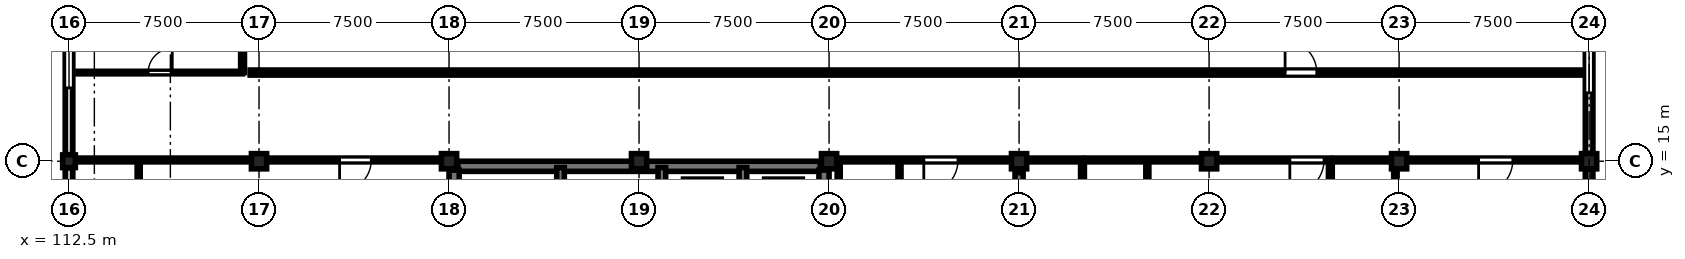
"""IFC4 building model, lengths in metres.
Left out: names, types, materials, properties, quantities, classifications, styles, units other than length and angle.
Written with IfcOpenShell. Run it as: python <this file> out.ifc"""

import sys

from ifc_helpers import new_model, si_unit, direction, frame, frame_2d, origin, origin_2d, place, context, subcontext, project, spatial, rectangle, circle, extrude, element, fill, save


model = new_model("IFC4")
c1 = context("Model", 3, precision=1e-05, world=origin(), true_north=direction((0.0, 1.0)))
c2 = subcontext(c1, "Body", "Model", "MODEL_VIEW")
j1 = project(units=[si_unit("LENGTHUNIT", "METRE"), si_unit("PLANEANGLEUNIT", "RADIAN")], contexts=[c1])
p1 = place(None, origin())
s1 = spatial("IfcSite", under=j1, at=p1, CompositionType="ELEMENT")
p2 = place(p1, origin())
s2 = spatial("IfcBuilding", under=s1, at=p2, CompositionType="ELEMENT")
p3 = place(p2, frame((0.0, 0.0, 14.1)))
s3 = spatial("IfcBuildingStorey", under=s2, at=p3, CompositionType="ELEMENT", Elevation=14.1)
p4 = place(p3, frame((112.5, 15.0, 0.0), z_axis=(0.0, 0.0, 1.0), x_axis=(1.0, 0.0, 0.0)))
e1 = element("IfcColumn", 1, at=p4, inside=s3, PredefinedType="COLUMN", context=c2, shape_type="SweptSolid", body=[
    extrude(rectangle(XDim=0.5, YDim=0.5, at=origin_2d()), origin(), (0.0, 0.0, 1.0), 3.75),
])
p5 = place(p3, frame((120.0, 15.0, 0.0), z_axis=(0.0, 0.0, 1.0), x_axis=(1.0, 0.0, 0.0)))
e2 = element("IfcColumn", 2, at=p5, inside=s3, PredefinedType="COLUMN", context=c2, shape_type="SweptSolid", body=[
    extrude(circle(Radius=0.3, at=origin_2d()), origin(), (0.0, 0.0, 1.0), 3.75),
])
for number, where, z_axis, x_axis in (
    (3, (127.5, 15.0, 0.0), (0.0, 0.0, 1.0), (1.0, 0.0, 0.0)),
    (4, (135.0, 15.0, 0.0), (0.0, 0.0, 1.0), (1.0, 0.0, 0.0)),
):
    element("IfcColumn", number, at=place(p3, frame(where, z_axis=z_axis, x_axis=x_axis)), inside=s3, PredefinedType="COLUMN", context=c2, shape_type="SweptSolid", body=[
        extrude(rectangle(XDim=0.6, YDim=0.6, at=origin_2d()), origin(), (0.0, 0.0, 1.0), 3.75),
    ])
p6 = place(p3, frame((142.5, 15.0, 0.0), z_axis=(0.0, 0.0, 1.0), x_axis=(1.0, 0.0, 0.0)))
e5 = element("IfcColumn", 5, at=p6, inside=s3, PredefinedType="COLUMN", context=c2, shape_type="SweptSolid", body=[
    extrude(circle(Radius=0.3, at=origin_2d()), origin(), (0.0, 0.0, 1.0), 3.75),
])
for number, where, z_axis, x_axis in (
    (6, (150.0, 15.0, 0.0), (0.0, 0.0, 1.0), (1.0, 0.0, 0.0)),
    (7, (157.5, 15.0, 0.0), (0.0, 0.0, 1.0), (1.0, 0.0, 0.0)),
):
    element("IfcColumn", number, at=place(p3, frame(where, z_axis=z_axis, x_axis=x_axis)), inside=s3, PredefinedType="COLUMN", context=c2, shape_type="SweptSolid", body=[
        extrude(rectangle(XDim=0.6, YDim=0.6, at=origin_2d()), origin(), (0.0, 0.0, 1.0), 3.75),
    ])
p7 = place(p3, frame((165.0, 15.0, 0.0), z_axis=(0.0, 0.0, 1.0), x_axis=(1.0, 0.0, 0.0)))
e8 = element("IfcColumn", 8, at=p7, inside=s3, PredefinedType="COLUMN", context=c2, shape_type="SweptSolid", body=[
    extrude(circle(Radius=0.3, at=origin_2d()), origin(), (0.0, 0.0, 1.0), 3.75),
])
p8 = place(p3, frame((172.5, 15.0, 0.0), z_axis=(0.0, 0.0, 1.0), x_axis=(1.0, 0.0, 0.0)))
e9 = element("IfcColumn", 9, at=p8, inside=s3, PredefinedType="COLUMN", context=c2, shape_type="SweptSolid", body=[
    extrude(rectangle(XDim=0.6, YDim=0.6, at=origin_2d()), origin(), (0.0, 0.0, 1.0), 3.75),
])
p9 = place(p3, frame((150.0, 7.95, 0.0), z_axis=(0.0, 0.0, 1.0), x_axis=(0.0, 1.0, 0.0)))
e10 = element("IfcWall", 10, at=p9, inside=s3, PredefinedType="SHEAR", context=c2, shape_type="SweptSolid", body=[
    extrude(rectangle(XDim=6.6, YDim=0.32, at=frame_2d((3.3, 0.0))), origin(), (0.0, 0.0, 1.0), 2.92),
])
p10 = place(p3, frame((112.5, 7.785, 0.0), z_axis=(0.0, 0.0, 1.0), x_axis=(0.0, 1.0, 0.0)))
e11 = element("IfcWall", 11, at=p10, inside=s3, PredefinedType="STANDARD", context=c2, shape_type="SweptSolid", body=[
    extrude(rectangle(XDim=6.955, YDim=0.3, at=frame_2d((3.478, 0.0))), origin(), (0.0, 0.0, 1.0), 2.87),
])
p11 = place(p10, frame((2.677, 0.0, 0.9)))
e12 = element("IfcOpeningElement", 12, at=p11, cuts=e11, PredefinedType="OPENING", context=c2, shape_type="SweptSolid", body=[
    extrude(rectangle(XDim=1.6, YDim=1.69, at=frame_2d((0.8, 0.845))), frame((0.0, 0.16, 0.0), z_axis=(0.0, -1.0, 0.0), x_axis=(1.0, 0.0, 0.0)), (0.0, 0.0, 1.0), 0.32),
])
p12 = place(p3, frame((112.5, 15.26, 0.0), z_axis=(0.0, 0.0, 1.0), x_axis=(0.0, 1.0, 0.0)))
e13 = element("IfcWall", 13, at=p12, inside=s3, PredefinedType="STANDARD", context=c2, shape_type="SweptSolid", body=[
    extrude(rectangle(XDim=7.07, YDim=0.3, at=frame_2d((3.535, 0.0))), origin(), (0.0, 0.0, 1.0), 2.87),
])
p13 = place(p12, frame((2.635, 0.0, 0.9)))
e14 = element("IfcOpeningElement", 14, at=p13, cuts=e13, PredefinedType="OPENING", context=c2, shape_type="SweptSolid", body=[
    extrude(rectangle(XDim=1.8, YDim=1.69, at=frame_2d((0.9, 0.845))), frame((0.0, 0.16, 0.0), z_axis=(0.0, -1.0, 0.0), x_axis=(1.0, 0.0, 0.0)), (0.0, 0.0, 1.0), 0.32),
])
p14 = place(p3, frame((172.5, 14.69, 0.0), z_axis=(0.0, 0.0, 1.0), x_axis=(0.0, -1.0, 0.0)))
e15 = element("IfcWall", 15, at=p14, inside=s3, PredefinedType="STANDARD", context=c2, shape_type="SweptSolid", body=[
    extrude(rectangle(XDim=6.88, YDim=0.3, at=frame_2d((3.44, 0.0))), origin(), (0.0, 0.0, 1.0), 2.87),
])
p15 = place(p14, frame((2.69, 0.0, 0.9)))
e16 = element("IfcOpeningElement", 16, at=p15, cuts=e15, PredefinedType="OPENING", context=c2, shape_type="SweptSolid", body=[
    extrude(rectangle(XDim=1.5, YDim=1.69, at=frame_2d((0.75, 0.845))), frame((0.0, 0.16, 0.0), z_axis=(0.0, -1.0, 0.0), x_axis=(1.0, 0.0, 0.0)), (0.0, 0.0, 1.0), 0.32),
])
p16 = place(p3, frame((172.5, 22.19, 0.0), z_axis=(0.0, 0.0, 1.0), x_axis=(0.0, -1.0, 0.0)))
e17 = element("IfcWall", 17, at=p16, inside=s3, PredefinedType="STANDARD", context=c2, shape_type="SweptSolid", body=[
    extrude(rectangle(XDim=6.88, YDim=0.3, at=frame_2d((3.44, 0.0))), origin(), (0.0, 0.0, 1.0), 2.87),
])
p17 = place(p16, frame((2.39, 0.0, 0.9)))
e18 = element("IfcOpeningElement", 18, at=p17, cuts=e17, PredefinedType="OPENING", context=c2, shape_type="SweptSolid", body=[
    extrude(rectangle(XDim=2.1, YDim=1.69, at=frame_2d((1.05, 0.845))), frame((0.0, 0.16, 0.0), z_axis=(0.0, -1.0, 0.0), x_axis=(1.0, 0.0, 0.0)), (0.0, 0.0, 1.0), 0.32),
])
p18 = place(p3, frame((127.85, 14.8, 0.0), z_axis=(0.0, 0.0, 1.0), x_axis=(1.0, 0.0, 0.0)))
e19 = element("IfcWall", 19, at=p18, inside=s3, PredefinedType="SHEAR", context=c2, shape_type="SweptSolid", body=[
    extrude(rectangle(XDim=14.3, YDim=0.4, at=frame_2d((7.15, 0.0))), origin(), (0.0, 0.0, 1.0), 3.47),
])
p19 = place(p3, frame((127.7, 7.85, 0.0), z_axis=(0.0, 0.0, 1.0), x_axis=(0.0, 1.0, 0.0)))
e20 = element("IfcWall", 20, at=p19, inside=s3, PredefinedType="SHEAR", context=c2, shape_type="SweptSolid", body=[
    extrude(rectangle(XDim=6.8, YDim=0.4, at=frame_2d((3.4, 0.0))), origin(), (0.0, 0.0, 1.0), 3.47),
])
p20 = place(p3, frame((142.3, 11.6, 0.0), z_axis=(0.0, 0.0, 1.0), x_axis=(0.0, 1.0, 0.0)))
e21 = element("IfcWall", 21, at=p20, inside=s3, PredefinedType="SHEAR", context=c2, shape_type="SweptSolid", body=[
    extrude(rectangle(XDim=3.05, YDim=0.4, at=frame_2d((1.525, 0.0))), origin(), (0.0, 0.0, 1.0), 3.47),
])
for number, where, z_axis, x_axis in (
    (22, (131.9, 11.6, 0.0), (0.0, 0.0, 1.0), (0.0, 1.0, 0.0)),
    (23, (135.9, 11.6, 0.0), (0.0, 0.0, 1.0), (0.0, 1.0, 0.0)),
    (24, (139.1, 11.6, 0.0), (0.0, 0.0, 1.0), (0.0, 1.0, 0.0)),
):
    element("IfcWall", number, at=place(p3, frame(where, z_axis=z_axis, x_axis=x_axis)), inside=s3, PredefinedType="SHEAR", context=c2, shape_type="SweptSolid", body=[
        extrude(rectangle(XDim=3.15, YDim=0.3, at=frame_2d((1.575, 0.0))), origin(), (0.0, 0.0, 1.0), 3.47),
    ])
p21 = place(p3, frame((127.2, 15.05, 0.0), z_axis=(0.0, 0.0, 1.0), x_axis=(-1.0, 0.0, 0.0)))
e25 = element("IfcWall", 25, at=p21, inside=s3, PredefinedType="PARTITIONING", context=c2, shape_type="SweptSolid", body=[
    extrude(rectangle(XDim=14.35, YDim=0.15, at=frame_2d((7.175, 0.0))), origin(), (0.0, 0.0, 1.0), 2.855),
])
p22 = place(p21, frame((2.77, 0.0, 0.0)))
e26 = element("IfcOpeningElement", 26, at=p22, cuts=e25, PredefinedType="OPENING", context=c2, shape_type="SweptSolid", body=[
    extrude(rectangle(XDim=1.25, YDim=2.2, at=frame_2d((0.625, 1.1))), frame((0.0, 0.085, 0.0), z_axis=(0.0, -1.0, 0.0), x_axis=(1.0, 0.0, 0.0)), (0.0, 0.0, 1.0), 0.17),
])
p23 = place(p3, frame((115.25, 13.05, 0.0), z_axis=(0.0, 0.0, 1.0), x_axis=(0.0, 1.0, 0.0)))
e27 = element("IfcWall", 27, at=p23, inside=s3, PredefinedType="PARTITIONING", context=c2, shape_type="SweptSolid", body=[
    extrude(rectangle(XDim=2.0, YDim=0.12, at=frame_2d((1.0, 0.0))), origin(), (0.0, 0.0, 1.0), 3.455),
])
p24 = place(p3, frame((152.503, 15.05, 0.0), z_axis=(0.0, 0.0, 1.0), x_axis=(-1.0, 0.0, 0.0)))
e28 = element("IfcWall", 28, at=p24, inside=s3, PredefinedType="PARTITIONING", context=c2, shape_type="SweptSolid", body=[
    extrude(rectangle(XDim=9.624, YDim=0.15, at=frame_2d((4.812, 0.0))), origin(), (0.0, 0.0, 1.0), 2.855),
])
p25 = place(p24, frame((4.914, 0.0, 0.0)))
e29 = element("IfcOpeningElement", 29, at=p25, cuts=e28, PredefinedType="OPENING", context=c2, shape_type="SweptSolid", body=[
    extrude(rectangle(XDim=1.35, YDim=2.25, at=frame_2d((0.675, 1.125))), frame((0.0, 0.085, 0.0), z_axis=(0.0, -1.0, 0.0), x_axis=(1.0, 0.0, 0.0)), (0.0, 0.0, 1.0), 0.17),
])
p26 = place(p3, frame((145.28, 13.05, 0.0), z_axis=(0.0, 0.0, 1.0), x_axis=(0.0, 1.0, 0.0)))
e30 = element("IfcWall", 30, at=p26, inside=s3, PredefinedType="PARTITIONING", context=c2, shape_type="SweptSolid", body=[
    extrude(rectangle(XDim=2.0, YDim=0.12, at=frame_2d((1.0, 0.0))), origin(), (0.0, 0.0, 1.0), 3.455),
])
p27 = place(p3, frame((162.287, 15.05, 0.0), z_axis=(0.0, 0.0, 1.0), x_axis=(-1.0, 0.0, 0.0)))
e31 = element("IfcWall", 31, at=p27, inside=s3, PredefinedType="PARTITIONING", context=c2, shape_type="SweptSolid", body=[
    extrude(rectangle(XDim=9.623, YDim=0.15, at=frame_2d((4.812, 0.0))), origin(), (0.0, 0.0, 1.0), 2.855),
])
p28 = place(p27, frame((0.25, 0.0, 0.0)))
e32 = element("IfcOpeningElement", 32, at=p28, cuts=e31, PredefinedType="OPENING", context=c2, shape_type="SweptSolid", body=[
    extrude(rectangle(XDim=1.35, YDim=2.25, at=frame_2d((0.675, 1.125))), frame((0.0, 0.085, 0.0), z_axis=(0.0, -1.0, 0.0), x_axis=(1.0, 0.0, 0.0)), (0.0, 0.0, 1.0), 0.17),
])
p29 = place(p3, frame((155.063, 13.05, 0.0), z_axis=(0.0, 0.0, 1.0), x_axis=(0.0, 1.0, 0.0)))
e33 = element("IfcWall", 33, at=p29, inside=s3, PredefinedType="PARTITIONING", context=c2, shape_type="SweptSolid", body=[
    extrude(rectangle(XDim=2.0, YDim=0.12, at=frame_2d((1.0, 0.0))), origin(), (0.0, 0.0, 1.0), 3.455),
])
p30 = place(p3, frame((172.07, 15.05, 0.0), z_axis=(0.0, 0.0, 1.0), x_axis=(-1.0, 0.0, 0.0)))
e34 = element("IfcWall", 34, at=p30, inside=s3, PredefinedType="PARTITIONING", context=c2, shape_type="SweptSolid", body=[
    extrude(rectangle(XDim=9.623, YDim=0.15, at=frame_2d((4.812, 0.0))), origin(), (0.0, 0.0, 1.0), 2.855),
])
p31 = place(p30, frame((2.582, 0.0, 0.0)))
e35 = element("IfcOpeningElement", 35, at=p31, cuts=e34, PredefinedType="OPENING", context=c2, shape_type="SweptSolid", body=[
    extrude(rectangle(XDim=1.35, YDim=2.25, at=frame_2d((0.675, 1.125))), frame((0.0, 0.085, 0.0), z_axis=(0.0, -1.0, 0.0), x_axis=(1.0, 0.0, 0.0)), (0.0, 0.0, 1.0), 0.17),
])
p32 = place(p3, frame((164.847, 13.05, 0.0), z_axis=(0.0, 0.0, 1.0), x_axis=(0.0, 1.0, 0.0)))
e36 = element("IfcWall", 36, at=p32, inside=s3, PredefinedType="PARTITIONING", context=c2, shape_type="SweptSolid", body=[
    extrude(rectangle(XDim=2.0, YDim=0.12, at=frame_2d((1.0, 0.0))), origin(), (0.0, 0.0, 1.0), 2.955),
])
p33 = place(p3, frame((112.85, 18.5, 0.0), z_axis=(0.0, 0.0, 1.0), x_axis=(1.0, 0.0, 0.0)))
e37 = element("IfcWall", 37, at=p33, inside=s3, PredefinedType="PARTITIONING", context=c2, shape_type="SweptSolid", body=[
    extrude(rectangle(XDim=6.5, YDim=0.1, at=frame_2d((3.25, 0.0))), origin(), (0.0, 0.0, 1.0), 3.455),
])
p34 = place(p33, frame((2.775, 0.0, 0.0)))
e38 = element("IfcOpeningElement", 38, at=p34, cuts=e37, PredefinedType="OPENING", context=c2, shape_type="SweptSolid", body=[
    extrude(rectangle(XDim=0.95, YDim=2.15, at=frame_2d((0.475, 1.075))), frame((0.0, 0.06, 0.0), z_axis=(0.0, -1.0, 0.0), x_axis=(1.0, 0.0, 0.0)), (0.0, 0.0, 1.0), 0.12),
])
p35 = place(p3, frame((119.65, 18.5, 0.0), z_axis=(0.0, 0.0, 1.0), x_axis=(1.0, 0.0, 0.0)))
e39 = element("IfcWall", 39, at=p35, inside=s3, PredefinedType="STANDARD", context=c2, shape_type="SweptSolid", body=[
    extrude(rectangle(XDim=52.5, YDim=0.2, at=frame_2d((26.25, 0.0))), origin(), (0.0, 0.0, 1.0), 3.455),
])
p36 = place(p35, frame((40.85, 0.0, 0.0)))
e40 = element("IfcOpeningElement", 40, at=p36, cuts=e39, PredefinedType="OPENING", context=c2, shape_type="SweptSolid", body=[
    extrude(rectangle(XDim=1.25, YDim=2.2, at=frame_2d((0.625, 1.1))), frame((0.0, 0.11, 0.0), z_axis=(0.0, -1.0, 0.0), x_axis=(1.0, 0.0, 0.0)), (0.0, 0.0, 1.0), 0.22),
])
p37 = place(p3, frame((152.503, 7.85, 0.0), z_axis=(0.0, 0.0, 1.0), x_axis=(0.0, 1.0, 0.0)))
e41 = element("IfcWall", 41, at=p37, inside=s3, PredefinedType="PARTITIONING", context=c2, shape_type="SweptSolid", body=[
    extrude(rectangle(XDim=7.2, YDim=0.15, at=frame_2d((3.6, 0.0))), origin(), (0.0, 0.0, 1.0), 3.455),
])
p38 = place(p3, frame((162.287, 9.1, 0.0), z_axis=(0.0, 0.0, 1.0), x_axis=(0.0, 1.0, 0.0)))
e42 = element("IfcWall", 42, at=p38, inside=s3, PredefinedType="PARTITIONING", context=c2, shape_type="SweptSolid", body=[
    extrude(rectangle(XDim=5.95, YDim=0.15, at=frame_2d((2.975, 0.0))), origin(), (0.0, 0.0, 1.0), 3.455),
])
p39 = place(p3, frame((119.35, 18.5, 0.0), z_axis=(0.0, 0.0, 1.0), x_axis=(0.0, 1.0, 0.0)))
e43 = element("IfcWall", 43, at=p39, inside=s3, PredefinedType="PARTITIONING", context=c2, shape_type="SweptSolid", body=[
    extrude(rectangle(XDim=3.65, YDim=0.15, at=frame_2d((1.825, 0.0))), origin(), (0.0, 0.0, 1.0), 3.455),
])
p40 = place(p3, frame((142.88, 13.05, 0.0), z_axis=(0.0, 0.0, 1.0), x_axis=(0.0, 1.0, 0.0)))
e44 = element("IfcWall", 44, at=p40, inside=s3, PredefinedType="PARTITIONING", context=c2, shape_type="SweptSolid", body=[
    extrude(rectangle(XDim=2.0, YDim=0.12, at=frame_2d((1.0, 0.0))), origin(), (0.0, 0.0, 1.0), 2.905),
])
p41 = place(p13, origin())
e45 = element("IfcWindow", 45, at=p41, inside=s3, PartitioningType="SINGLE_PANEL", PredefinedType="WINDOW", context=c2, shape_type="SweptSolid", body=[
    extrude(rectangle(XDim=1.8, YDim=1.69, at=frame_2d((0.9, 0.845))), frame((0.0, 0.03, 0.0), z_axis=(0.0, -1.0, 0.0), x_axis=(1.0, 0.0, 0.0)), (0.0, 0.0, 1.0), 0.06),
])
fill(e14, e45)
p42 = place(p17, origin())
e46 = element("IfcWindow", 46, at=p42, inside=s3, PartitioningType="SINGLE_PANEL", PredefinedType="WINDOW", context=c2, shape_type="SweptSolid", body=[
    extrude(rectangle(XDim=2.1, YDim=1.69, at=frame_2d((1.05, 0.845))), frame((0.0, 0.03, 0.0), z_axis=(0.0, -1.0, 0.0), x_axis=(1.0, 0.0, 0.0)), (0.0, 0.0, 1.0), 0.06),
])
fill(e18, e46)
p43 = place(p22, origin())
e47 = element("IfcDoor", 47, at=p43, inside=s3, OperationType="SINGLE_SWING_RIGHT", PredefinedType="DOOR", context=c2, shape_type="SweptSolid", body=[
    extrude(rectangle(XDim=1.25, YDim=2.2, at=frame_2d((0.625, 1.1))), frame((0.0, 0.025, 0.0), z_axis=(0.0, -1.0, 0.0), x_axis=(1.0, 0.0, 0.0)), (0.0, 0.0, 1.0), 0.05),
])
fill(e26, e47)
p44 = place(p25, origin())
e48 = element("IfcDoor", 48, at=p44, inside=s3, OperationType="SINGLE_SWING_RIGHT", PredefinedType="DOOR", context=c2, shape_type="SweptSolid", body=[
    extrude(rectangle(XDim=1.35, YDim=2.25, at=frame_2d((0.675, 1.125))), frame((0.0, 0.025, 0.0), z_axis=(0.0, -1.0, 0.0), x_axis=(1.0, 0.0, 0.0)), (0.0, 0.0, 1.0), 0.05),
])
fill(e29, e48)
p45 = place(p28, origin())
e49 = element("IfcDoor", 49, at=p45, inside=s3, OperationType="SINGLE_SWING_RIGHT", PredefinedType="DOOR", context=c2, shape_type="SweptSolid", body=[
    extrude(rectangle(XDim=1.35, YDim=2.25, at=frame_2d((0.675, 1.125))), frame((0.0, 0.025, 0.0), z_axis=(0.0, -1.0, 0.0), x_axis=(1.0, 0.0, 0.0)), (0.0, 0.0, 1.0), 0.05),
])
fill(e32, e49)
p46 = place(p31, origin())
e50 = element("IfcDoor", 50, at=p46, inside=s3, OperationType="SINGLE_SWING_RIGHT", PredefinedType="DOOR", context=c2, shape_type="SweptSolid", body=[
    extrude(rectangle(XDim=1.35, YDim=2.25, at=frame_2d((0.675, 1.125))), frame((0.0, 0.025, 0.0), z_axis=(0.0, -1.0, 0.0), x_axis=(1.0, 0.0, 0.0)), (0.0, 0.0, 1.0), 0.05),
])
fill(e35, e50)
p47 = place(p34, origin())
e51 = element("IfcDoor", 51, at=p47, inside=s3, OperationType="SINGLE_SWING_RIGHT", PredefinedType="DOOR", context=c2, shape_type="SweptSolid", body=[
    extrude(rectangle(XDim=0.95, YDim=2.15, at=frame_2d((0.475, 1.075))), frame((0.0, 0.025, 0.0), z_axis=(0.0, -1.0, 0.0), x_axis=(1.0, 0.0, 0.0)), (0.0, 0.0, 1.0), 0.05),
])
fill(e38, e51)
p48 = place(p36, origin())
e52 = element("IfcDoor", 52, at=p48, inside=s3, OperationType="SINGLE_SWING_LEFT", PredefinedType="DOOR", context=c2, shape_type="SweptSolid", body=[
    extrude(rectangle(XDim=1.25, YDim=2.2, at=frame_2d((0.625, 1.1))), frame((0.0, 0.025, 0.0), z_axis=(0.0, -1.0, 0.0), x_axis=(1.0, 0.0, 0.0)), (0.0, 0.0, 1.0), 0.05),
])
fill(e40, e52)
save(model, sys.argv[1])
